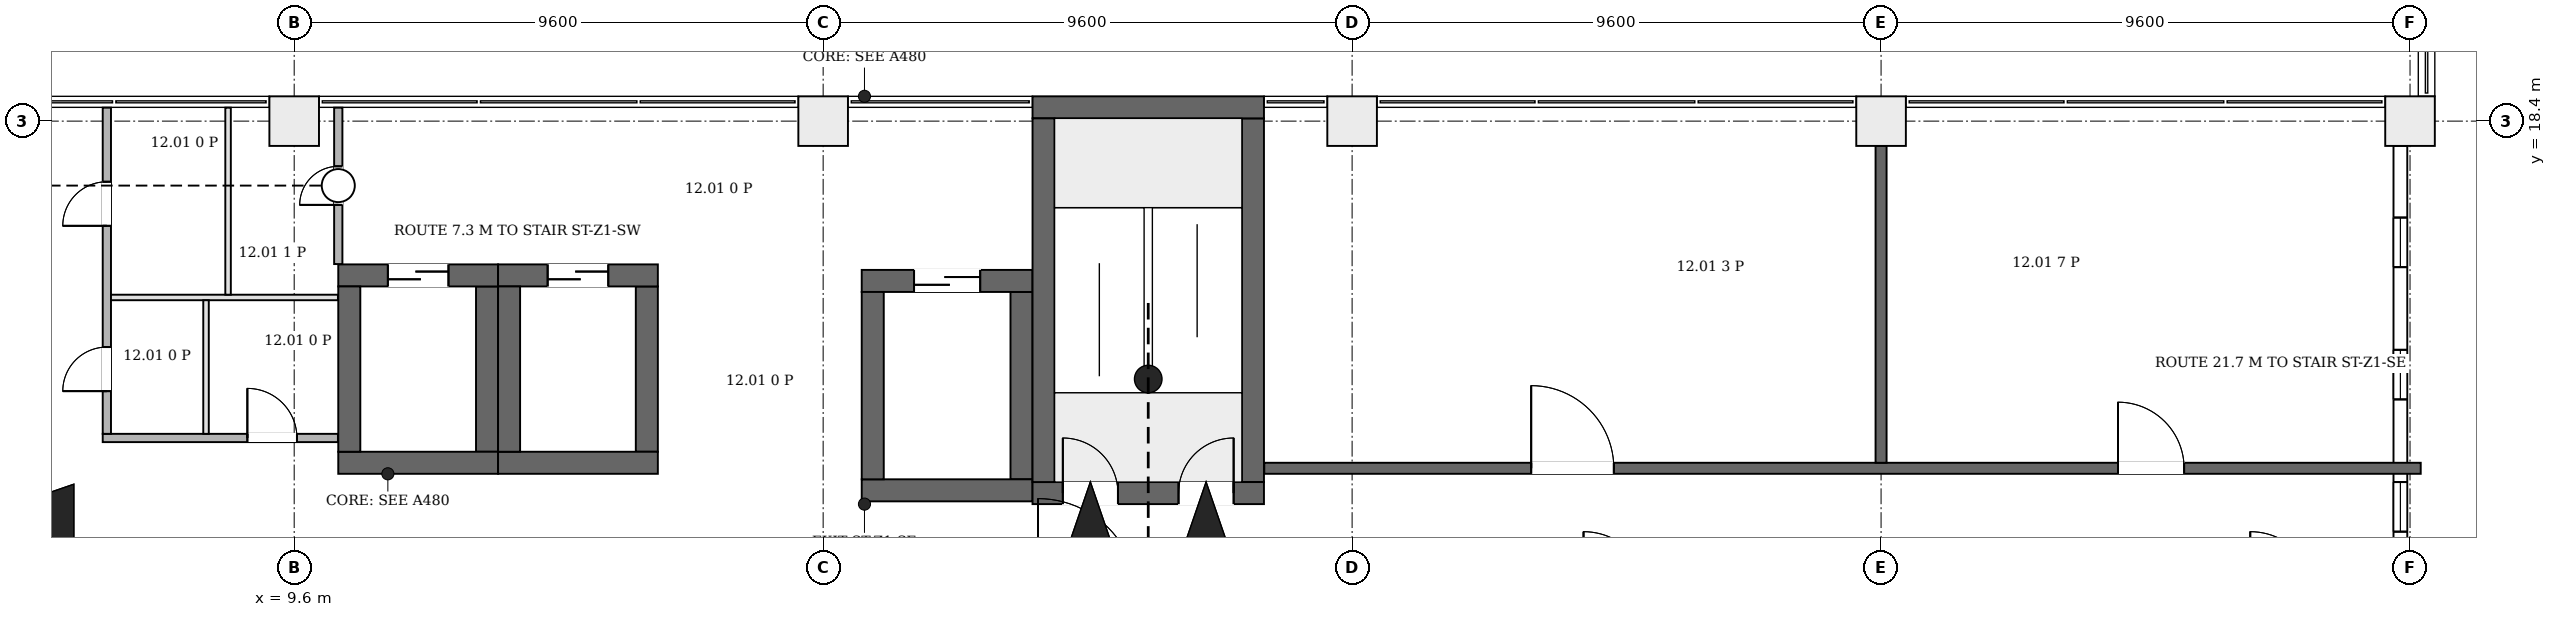
"""IFC4 building model, lengths in metres.
Left out: names, types, materials, properties, quantities, classifications, styles, units other than length and angle.
Written with IfcOpenShell. Run it as: python <this file> out.ifc"""

import sys

from ifc_helpers import new_model, si_unit, direction, frame, frame_2d, origin, origin_2d, place, context, subcontext, project, spatial, rectangle, extrude, element, fill, save


model = new_model("IFC4")
c1 = context("Model", 3, precision=1e-05, world=origin(), true_north=direction((0.0, 1.0)))
c2 = subcontext(c1, "Body", "Model", "MODEL_VIEW")
j1 = project(units=[si_unit("LENGTHUNIT", "METRE"), si_unit("PLANEANGLEUNIT", "RADIAN")], contexts=[c1])
p1 = place(None, origin())
s1 = spatial("IfcSite", under=j1, at=p1, CompositionType="ELEMENT")
p2 = place(p1, origin())
s2 = spatial("IfcBuilding", under=s1, at=p2, CompositionType="ELEMENT")
p3 = place(p2, frame((0.0, 0.0, 61.3)))
s3 = spatial("IfcBuildingStorey", under=s2, at=p3, CompositionType="ELEMENT", Elevation=61.3)
p4 = place(p3, frame((23.0, 11.65, 0.0), z_axis=(0.0, 0.0, 1.0), x_axis=(1.0, 0.0, 0.0)))
e1 = element("IfcWall", 1, at=p4, inside=s3, PredefinedType="SHEAR", context=c2, shape_type="SweptSolid", body=[
    extrude(rectangle(XDim=4.2, YDim=0.4, at=frame_2d((2.1, 0.0))), origin(), (0.0, 0.0, 1.0), 4.2),
])
p5 = place(p4, frame((0.55, 0.0, 0.0)))
e2 = element("IfcOpeningElement", 2, at=p5, cuts=e1, PredefinedType="OPENING", context=c2, shape_type="SweptSolid", body=[
    extrude(rectangle(XDim=1.0, YDim=2.1, at=frame_2d((0.5, 1.05))), frame((0.0, 0.21, 0.0), z_axis=(0.0, -1.0, 0.0), x_axis=(1.0, 0.0, 0.0)), (0.0, 0.0, 1.0), 0.42),
])
p6 = place(p4, frame((2.65, 0.0, 0.0)))
e3 = element("IfcOpeningElement", 3, at=p6, cuts=e1, PredefinedType="OPENING", context=c2, shape_type="SweptSolid", body=[
    extrude(rectangle(XDim=1.0, YDim=2.1, at=frame_2d((0.5, 1.05))), frame((0.0, 0.21, 0.0), z_axis=(0.0, -1.0, 0.0), x_axis=(1.0, 0.0, 0.0)), (0.0, 0.0, 1.0), 0.42),
])
p7 = place(p3, frame((23.0, 18.65, 0.0), z_axis=(0.0, 0.0, 1.0), x_axis=(1.0, 0.0, 0.0)))
e4 = element("IfcWall", 4, at=p7, inside=s3, PredefinedType="SHEAR", context=c2, shape_type="SweptSolid", body=[
    extrude(rectangle(XDim=4.2, YDim=0.4, at=frame_2d((2.1, 0.0))), origin(), (0.0, 0.0, 1.0), 4.2),
])
for number, where, z_axis, x_axis in (
    (5, (23.2, 11.85, 0.0), (0.0, 0.0, 1.0), (0.0, 1.0, 0.0)),
    (6, (27.0, 11.85, 0.0), (0.0, 0.0, 1.0), (0.0, 1.0, 0.0)),
):
    element("IfcWall", number, at=place(p3, frame(where, z_axis=z_axis, x_axis=x_axis)), inside=s3, PredefinedType="SHEAR", context=c2, shape_type="SweptSolid", body=[
        extrude(rectangle(XDim=6.6, YDim=0.4, at=frame_2d((3.3, 0.0))), origin(), (0.0, 0.0, 1.0), 4.2),
    ])
p8 = place(p3, frame((10.4, 12.2, 0.0), z_axis=(0.0, 0.0, 1.0), x_axis=(1.0, 0.0, 0.0)))
e7 = element("IfcWall", 7, at=p8, inside=s3, PredefinedType="SHEAR", context=c2, shape_type="SweptSolid", body=[
    extrude(rectangle(XDim=2.9, YDim=0.4, at=frame_2d((1.45, 0.0))), origin(), (0.0, 0.0, 1.0), 4.2),
])
p9 = place(p3, frame((10.4, 15.6, 0.0), z_axis=(0.0, 0.0, 1.0), x_axis=(1.0, 0.0, 0.0)))
e8 = element("IfcWall", 8, at=p9, inside=s3, PredefinedType="SHEAR", context=c2, shape_type="SweptSolid", body=[
    extrude(rectangle(XDim=2.9, YDim=0.4, at=frame_2d((1.45, 0.0))), origin(), (0.0, 0.0, 1.0), 4.2),
])
p10 = place(p9, frame((0.9, 0.0, 0.0)))
e9 = element("IfcOpeningElement", 9, at=p10, cuts=e8, PredefinedType="OPENING", context=c2, shape_type="SweptSolid", body=[
    extrude(rectangle(XDim=1.1, YDim=2.1, at=frame_2d((0.55, 1.05))), frame((0.0, 0.21, 0.0), z_axis=(0.0, -1.0, 0.0), x_axis=(1.0, 0.0, 0.0)), (0.0, 0.0, 1.0), 0.42),
])
for number, where, z_axis, x_axis in (
    (10, (10.6, 12.4, 0.0), (0.0, 0.0, 1.0), (0.0, 1.0, 0.0)),
    (11, (13.1, 12.4, 0.0), (0.0, 0.0, 1.0), (0.0, 1.0, 0.0)),
):
    element("IfcWall", number, at=place(p3, frame(where, z_axis=z_axis, x_axis=x_axis)), inside=s3, PredefinedType="SHEAR", context=c2, shape_type="SweptSolid", body=[
        extrude(rectangle(XDim=3.0, YDim=0.4, at=frame_2d((1.5, 0.0))), origin(), (0.0, 0.0, 1.0), 4.2),
    ])
p11 = place(p3, frame((13.3, 12.2, 0.0), z_axis=(0.0, 0.0, 1.0), x_axis=(1.0, 0.0, 0.0)))
e12 = element("IfcWall", 12, at=p11, inside=s3, PredefinedType="SHEAR", context=c2, shape_type="SweptSolid", body=[
    extrude(rectangle(XDim=2.9, YDim=0.4, at=frame_2d((1.45, 0.0))), origin(), (0.0, 0.0, 1.0), 4.2),
])
p12 = place(p3, frame((13.3, 15.6, 0.0), z_axis=(0.0, 0.0, 1.0), x_axis=(1.0, 0.0, 0.0)))
e13 = element("IfcWall", 13, at=p12, inside=s3, PredefinedType="SHEAR", context=c2, shape_type="SweptSolid", body=[
    extrude(rectangle(XDim=2.9, YDim=0.4, at=frame_2d((1.45, 0.0))), origin(), (0.0, 0.0, 1.0), 4.2),
])
p13 = place(p12, frame((0.9, 0.0, 0.0)))
e14 = element("IfcOpeningElement", 14, at=p13, cuts=e13, PredefinedType="OPENING", context=c2, shape_type="SweptSolid", body=[
    extrude(rectangle(XDim=1.1, YDim=2.1, at=frame_2d((0.55, 1.05))), frame((0.0, 0.21, 0.0), z_axis=(0.0, -1.0, 0.0), x_axis=(1.0, 0.0, 0.0)), (0.0, 0.0, 1.0), 0.42),
])
for number, where, z_axis, x_axis in (
    (15, (13.5, 12.4, 0.0), (0.0, 0.0, 1.0), (0.0, 1.0, 0.0)),
    (16, (16.0, 12.4, 0.0), (0.0, 0.0, 1.0), (0.0, 1.0, 0.0)),
):
    element("IfcWall", number, at=place(p3, frame(where, z_axis=z_axis, x_axis=x_axis)), inside=s3, PredefinedType="SHEAR", context=c2, shape_type="SweptSolid", body=[
        extrude(rectangle(XDim=3.0, YDim=0.4, at=frame_2d((1.5, 0.0))), origin(), (0.0, 0.0, 1.0), 4.2),
    ])
p14 = place(p3, frame((19.9, 11.7, 0.0), z_axis=(0.0, 0.0, 1.0), x_axis=(1.0, 0.0, 0.0)))
e17 = element("IfcWall", 17, at=p14, inside=s3, PredefinedType="SHEAR", context=c2, shape_type="SweptSolid", body=[
    extrude(rectangle(XDim=3.1, YDim=0.4, at=frame_2d((1.55, 0.0))), origin(), (0.0, 0.0, 1.0), 4.2),
])
p15 = place(p3, frame((19.9, 15.5, 0.0), z_axis=(0.0, 0.0, 1.0), x_axis=(1.0, 0.0, 0.0)))
e18 = element("IfcWall", 18, at=p15, inside=s3, PredefinedType="SHEAR", context=c2, shape_type="SweptSolid", body=[
    extrude(rectangle(XDim=3.1, YDim=0.4, at=frame_2d((1.55, 0.0))), origin(), (0.0, 0.0, 1.0), 4.2),
])
p16 = place(p15, frame((0.95, 0.0, 0.0)))
e19 = element("IfcOpeningElement", 19, at=p16, cuts=e18, PredefinedType="OPENING", context=c2, shape_type="SweptSolid", body=[
    extrude(rectangle(XDim=1.2, YDim=2.1, at=frame_2d((0.6, 1.05))), frame((0.0, 0.21, 0.0), z_axis=(0.0, -1.0, 0.0), x_axis=(1.0, 0.0, 0.0)), (0.0, 0.0, 1.0), 0.42),
])
for number, where, z_axis, x_axis in (
    (20, (20.1, 11.9, 0.0), (0.0, 0.0, 1.0), (0.0, 1.0, 0.0)),
    (21, (22.8, 11.9, 0.0), (0.0, 0.0, 1.0), (0.0, 1.0, 0.0)),
):
    element("IfcWall", number, at=place(p3, frame(where, z_axis=z_axis, x_axis=x_axis)), inside=s3, PredefinedType="SHEAR", context=c2, shape_type="SweptSolid", body=[
        extrude(rectangle(XDim=3.4, YDim=0.4, at=frame_2d((1.7, 0.0))), origin(), (0.0, 0.0, 1.0), 4.2),
    ])
for number, where, z_axis, x_axis in (
    (22, (9.6, 18.4, 0.0), (0.0, 0.0, 1.0), (1.0, 0.0, 0.0)),
    (23, (19.2, 18.4, 0.0), (0.0, 0.0, 1.0), (1.0, 0.0, 0.0)),
    (24, (28.8, 18.4, 0.0), (0.0, 0.0, 1.0), (1.0, 0.0, 0.0)),
    (25, (38.4, 18.4, 0.0), (0.0, 0.0, 1.0), (1.0, 0.0, 0.0)),
    (26, (48.0, 18.4, 0.0), (0.0, 0.0, 1.0), (1.0, 0.0, 0.0)),
):
    element("IfcColumn", number, at=place(p3, frame(where, z_axis=z_axis, x_axis=x_axis)), inside=s3, PredefinedType="COLUMN", context=c2, shape_type="SweptSolid", body=[
        extrude(rectangle(XDim=0.9, YDim=0.9, at=origin_2d()), origin(), (0.0, 0.0, 1.0), 4.2),
    ])
p17 = place(p3, frame((47.825, 9.65, 0.0), z_axis=(0.0, 0.0, 1.0), x_axis=(0.0, 1.0, 0.0)))
e27 = element("IfcWall", 27, at=p17, inside=s3, PredefinedType="ELEMENTEDWALL", context=c2, shape_type="SweptSolid", body=[
    extrude(rectangle(XDim=8.3, YDim=0.25, at=frame_2d((4.15, 0.0))), origin(), (0.0, 0.0, 1.0), 3.3),
])
p18 = place(p17, frame((1.3, 0.0, 0.6)))
e28 = element("IfcOpeningElement", 28, at=p18, cuts=e27, PredefinedType="OPENING", context=c2, shape_type="SweptSolid", body=[
    extrude(rectangle(XDim=0.9, YDim=2.6, at=frame_2d((0.45, 1.3))), frame((0.0, 0.135, 0.0), z_axis=(0.0, -1.0, 0.0), x_axis=(1.0, 0.0, 0.0)), (0.0, 0.0, 1.0), 0.27),
])
p19 = place(p17, frame((3.7, 0.0, 0.6)))
e29 = element("IfcOpeningElement", 29, at=p19, cuts=e27, PredefinedType="OPENING", context=c2, shape_type="SweptSolid", body=[
    extrude(rectangle(XDim=0.9, YDim=2.6, at=frame_2d((0.45, 1.3))), frame((0.0, 0.135, 0.0), z_axis=(0.0, -1.0, 0.0), x_axis=(1.0, 0.0, 0.0)), (0.0, 0.0, 1.0), 0.27),
])
p20 = place(p17, frame((6.1, 0.0, 0.6)))
e30 = element("IfcOpeningElement", 30, at=p20, cuts=e27, PredefinedType="OPENING", context=c2, shape_type="SweptSolid", body=[
    extrude(rectangle(XDim=0.9, YDim=2.6, at=frame_2d((0.45, 1.3))), frame((0.0, 0.135, 0.0), z_axis=(0.0, -1.0, 0.0), x_axis=(1.0, 0.0, 0.0)), (0.0, 0.0, 1.0), 0.27),
])
p21 = place(p3, frame((6.125, 12.65, 0.0), z_axis=(0.0, 0.0, 1.0), x_axis=(1.0, 0.0, 0.0)))
e31 = element("IfcWall", 31, at=p21, inside=s3, PredefinedType="PARTITIONING", context=c2, shape_type="SweptSolid", body=[
    extrude(rectangle(XDim=4.269, YDim=0.15, at=frame_2d((2.135, 0.0))), origin(), (0.0, 0.0, 1.0), 3.9),
])
p22 = place(p21, frame((2.625, 0.0, 0.0)))
e32 = element("IfcOpeningElement", 32, at=p22, cuts=e31, PredefinedType="OPENING", context=c2, shape_type="SweptSolid", body=[
    extrude(rectangle(XDim=0.9, YDim=2.1, at=frame_2d((0.45, 1.05))), frame((0.0, 0.085, 0.0), z_axis=(0.0, -1.0, 0.0), x_axis=(1.0, 0.0, 0.0)), (0.0, 0.0, 1.0), 0.17),
])
p23 = place(p3, frame((6.2, 12.725, 0.0), z_axis=(0.0, 0.0, 1.0), x_axis=(0.0, 1.0, 0.0)))
e33 = element("IfcWall", 33, at=p23, inside=s3, PredefinedType="PARTITIONING", context=c2, shape_type="SweptSolid", body=[
    extrude(rectangle(XDim=5.919, YDim=0.15, at=frame_2d((2.959, 0.0))), origin(), (0.0, 0.0, 1.0), 3.9),
])
p24 = place(p23, frame((0.775, 0.0, 0.0)))
e34 = element("IfcOpeningElement", 34, at=p24, cuts=e33, PredefinedType="OPENING", context=c2, shape_type="SweptSolid", body=[
    extrude(rectangle(XDim=0.8, YDim=2.1, at=frame_2d((0.4, 1.05))), frame((0.0, 0.085, 0.0), z_axis=(0.0, -1.0, 0.0), x_axis=(1.0, 0.0, 0.0)), (0.0, 0.0, 1.0), 0.17),
])
p25 = place(p23, frame((3.775, 0.0, 0.0)))
e35 = element("IfcOpeningElement", 35, at=p25, cuts=e33, PredefinedType="OPENING", context=c2, shape_type="SweptSolid", body=[
    extrude(rectangle(XDim=0.8, YDim=2.1, at=frame_2d((0.4, 1.05))), frame((0.0, 0.085, 0.0), z_axis=(0.0, -1.0, 0.0), x_axis=(1.0, 0.0, 0.0)), (0.0, 0.0, 1.0), 0.17),
])
p26 = place(p3, frame((6.275, 15.2, 0.0), z_axis=(0.0, 0.0, 1.0), x_axis=(1.0, 0.0, 0.0)))
e36 = element("IfcWall", 36, at=p26, inside=s3, PredefinedType="PARTITIONING", context=c2, shape_type="SweptSolid", body=[
    extrude(rectangle(XDim=4.119, YDim=0.1, at=frame_2d((2.06, 0.0))), origin(), (0.0, 0.0, 1.0), 3.9),
])
p27 = place(p3, frame((8.0, 12.725, 0.0), z_axis=(0.0, 0.0, 1.0), x_axis=(0.0, 1.0, 0.0)))
e37 = element("IfcWall", 37, at=p27, inside=s3, PredefinedType="PARTITIONING", context=c2, shape_type="SweptSolid", body=[
    extrude(rectangle(XDim=2.425, YDim=0.1, at=frame_2d((1.212, 0.0))), origin(), (0.0, 0.0, 1.0), 3.9),
])
p28 = place(p3, frame((8.4, 15.25, 0.0), z_axis=(0.0, 0.0, 1.0), x_axis=(0.0, 1.0, 0.0)))
e38 = element("IfcWall", 38, at=p28, inside=s3, PredefinedType="PARTITIONING", context=c2, shape_type="SweptSolid", body=[
    extrude(rectangle(XDim=3.394, YDim=0.1, at=frame_2d((1.697, 0.0))), origin(), (0.0, 0.0, 1.0), 3.9),
])
p29 = place(p3, frame((10.4, 15.806, 0.0), z_axis=(0.0, 0.0, 1.0), x_axis=(0.0, 1.0, 0.0)))
e39 = element("IfcWall", 39, at=p29, inside=s3, PredefinedType="PARTITIONING", context=c2, shape_type="SweptSolid", body=[
    extrude(rectangle(XDim=2.838, YDim=0.15, at=frame_2d((1.419, 0.0))), origin(), (0.0, 0.0, 1.0), 3.9),
])
p30 = place(p29, frame((1.074, 0.0, 0.0)))
e40 = element("IfcOpeningElement", 40, at=p30, cuts=e39, PredefinedType="OPENING", context=c2, shape_type="SweptSolid", body=[
    extrude(rectangle(XDim=0.7, YDim=2.1, at=frame_2d((0.35, 1.05))), frame((0.0, 0.085, 0.0), z_axis=(0.0, -1.0, 0.0), x_axis=(1.0, 0.0, 0.0)), (0.0, 0.0, 1.0), 0.17),
])
p31 = place(p3, frame((27.206, 12.1, 0.0), z_axis=(0.0, 0.0, 1.0), x_axis=(1.0, 0.0, 0.0)))
e41 = element("IfcWall", 41, at=p31, inside=s3, PredefinedType="PARTITIONING", context=c2, shape_type="SweptSolid", body=[
    extrude(rectangle(XDim=20.988, YDim=0.2, at=frame_2d((10.494, 0.0))), origin(), (0.0, 0.0, 1.0), 3.9),
])
p32 = place(p31, frame((4.844, 0.0, 0.0)))
e42 = element("IfcOpeningElement", 42, at=p32, cuts=e41, PredefinedType="OPENING", context=c2, shape_type="SweptSolid", body=[
    extrude(rectangle(XDim=1.5, YDim=2.1, at=frame_2d((0.75, 1.05))), frame((0.0, 0.11, 0.0), z_axis=(0.0, -1.0, 0.0), x_axis=(1.0, 0.0, 0.0)), (0.0, 0.0, 1.0), 0.22),
])
p33 = place(p31, frame((15.494, 0.0, 0.0)))
e43 = element("IfcOpeningElement", 43, at=p33, cuts=e41, PredefinedType="OPENING", context=c2, shape_type="SweptSolid", body=[
    extrude(rectangle(XDim=1.2, YDim=2.1, at=frame_2d((0.6, 1.05))), frame((0.0, 0.11, 0.0), z_axis=(0.0, -1.0, 0.0), x_axis=(1.0, 0.0, 0.0)), (0.0, 0.0, 1.0), 0.22),
])
p34 = place(p3, frame((38.4, 12.2, 0.0), z_axis=(0.0, 0.0, 1.0), x_axis=(0.0, 1.0, 0.0)))
e44 = element("IfcWall", 44, at=p34, inside=s3, PredefinedType="PARTITIONING", context=c2, shape_type="SweptSolid", body=[
    extrude(rectangle(XDim=5.75, YDim=0.2, at=frame_2d((2.875, 0.0))), origin(), (0.0, 0.0, 1.0), 3.9),
])
p35 = place(p18, origin())
e45 = element("IfcWindow", 45, at=p35, inside=s3, PartitioningType="SINGLE_PANEL", PredefinedType="WINDOW", context=c2, shape_type="SweptSolid", body=[
    extrude(rectangle(XDim=0.9, YDim=2.6, at=frame_2d((0.45, 1.3))), frame((0.0, 0.03, 0.0), z_axis=(0.0, -1.0, 0.0), x_axis=(1.0, 0.0, 0.0)), (0.0, 0.0, 1.0), 0.06),
])
fill(e28, e45)
p36 = place(p19, origin())
e46 = element("IfcWindow", 46, at=p36, inside=s3, PartitioningType="SINGLE_PANEL", PredefinedType="WINDOW", context=c2, shape_type="SweptSolid", body=[
    extrude(rectangle(XDim=0.9, YDim=2.6, at=frame_2d((0.45, 1.3))), frame((0.0, 0.03, 0.0), z_axis=(0.0, -1.0, 0.0), x_axis=(1.0, 0.0, 0.0)), (0.0, 0.0, 1.0), 0.06),
])
fill(e29, e46)
p37 = place(p20, origin())
e47 = element("IfcWindow", 47, at=p37, inside=s3, PartitioningType="SINGLE_PANEL", PredefinedType="WINDOW", context=c2, shape_type="SweptSolid", body=[
    extrude(rectangle(XDim=0.9, YDim=2.6, at=frame_2d((0.45, 1.3))), frame((0.0, 0.03, 0.0), z_axis=(0.0, -1.0, 0.0), x_axis=(1.0, 0.0, 0.0)), (0.0, 0.0, 1.0), 0.06),
])
fill(e30, e47)
p38 = place(p5, origin())
e48 = element("IfcDoor", 48, at=p38, inside=s3, OperationType="SINGLE_SWING_RIGHT", PredefinedType="DOOR", context=c2, shape_type="SweptSolid", body=[
    extrude(rectangle(XDim=1.0, YDim=2.1, at=frame_2d((0.5, 1.05))), frame((0.0, 0.025, 0.0), z_axis=(0.0, -1.0, 0.0), x_axis=(1.0, 0.0, 0.0)), (0.0, 0.0, 1.0), 0.05),
])
fill(e2, e48)
p39 = place(p6, origin())
e49 = element("IfcDoor", 49, at=p39, inside=s3, OperationType="SINGLE_SWING_LEFT", PredefinedType="DOOR", context=c2, shape_type="SweptSolid", body=[
    extrude(rectangle(XDim=1.0, YDim=2.1, at=frame_2d((0.5, 1.05))), frame((0.0, 0.025, 0.0), z_axis=(0.0, -1.0, 0.0), x_axis=(1.0, 0.0, 0.0)), (0.0, 0.0, 1.0), 0.05),
])
fill(e3, e49)
p40 = place(p10, origin())
e50 = element("IfcDoor", 50, at=p40, inside=s3, OperationType="DOUBLE_DOOR_SLIDING", PredefinedType="DOOR", context=c2, shape_type="SweptSolid", body=[
    extrude(rectangle(XDim=1.1, YDim=2.1, at=frame_2d((0.55, 1.05))), frame((0.0, 0.025, 0.0), z_axis=(0.0, -1.0, 0.0), x_axis=(1.0, 0.0, 0.0)), (0.0, 0.0, 1.0), 0.05),
])
fill(e9, e50)
p41 = place(p13, origin())
e51 = element("IfcDoor", 51, at=p41, inside=s3, OperationType="DOUBLE_DOOR_SLIDING", PredefinedType="DOOR", context=c2, shape_type="SweptSolid", body=[
    extrude(rectangle(XDim=1.1, YDim=2.1, at=frame_2d((0.55, 1.05))), frame((0.0, 0.025, 0.0), z_axis=(0.0, -1.0, 0.0), x_axis=(1.0, 0.0, 0.0)), (0.0, 0.0, 1.0), 0.05),
])
fill(e14, e51)
p42 = place(p16, origin())
e52 = element("IfcDoor", 52, at=p42, inside=s3, OperationType="DOUBLE_DOOR_SLIDING", PredefinedType="DOOR", context=c2, shape_type="SweptSolid", body=[
    extrude(rectangle(XDim=1.2, YDim=2.1, at=frame_2d((0.6, 1.05))), frame((0.0, 0.025, 0.0), z_axis=(0.0, -1.0, 0.0), x_axis=(1.0, 0.0, 0.0)), (0.0, 0.0, 1.0), 0.05),
])
fill(e19, e52)
p43 = place(p24, origin())
e53 = element("IfcDoor", 53, at=p43, inside=s3, OperationType="SINGLE_SWING_LEFT", PredefinedType="DOOR", context=c2, shape_type="SweptSolid", body=[
    extrude(rectangle(XDim=0.8, YDim=2.1, at=frame_2d((0.4, 1.05))), frame((0.0, 0.025, 0.0), z_axis=(0.0, -1.0, 0.0), x_axis=(1.0, 0.0, 0.0)), (0.0, 0.0, 1.0), 0.05),
])
fill(e34, e53)
p44 = place(p22, origin())
e54 = element("IfcDoor", 54, at=p44, inside=s3, OperationType="SINGLE_SWING_RIGHT", PredefinedType="DOOR", context=c2, shape_type="SweptSolid", body=[
    extrude(rectangle(XDim=0.9, YDim=2.1, at=frame_2d((0.45, 1.05))), frame((0.0, 0.025, 0.0), z_axis=(0.0, -1.0, 0.0), x_axis=(1.0, 0.0, 0.0)), (0.0, 0.0, 1.0), 0.05),
])
fill(e32, e54)
p45 = place(p25, origin())
e55 = element("IfcDoor", 55, at=p45, inside=s3, OperationType="SINGLE_SWING_LEFT", PredefinedType="DOOR", context=c2, shape_type="SweptSolid", body=[
    extrude(rectangle(XDim=0.8, YDim=2.1, at=frame_2d((0.4, 1.05))), frame((0.0, 0.025, 0.0), z_axis=(0.0, -1.0, 0.0), x_axis=(1.0, 0.0, 0.0)), (0.0, 0.0, 1.0), 0.05),
])
fill(e35, e55)
p46 = place(p30, origin())
e56 = element("IfcDoor", 56, at=p46, inside=s3, OperationType="SINGLE_SWING_LEFT", PredefinedType="DOOR", context=c2, shape_type="SweptSolid", body=[
    extrude(rectangle(XDim=0.7, YDim=2.1, at=frame_2d((0.35, 1.05))), frame((0.0, 0.025, 0.0), z_axis=(0.0, -1.0, 0.0), x_axis=(1.0, 0.0, 0.0)), (0.0, 0.0, 1.0), 0.05),
])
fill(e40, e56)
p47 = place(p32, origin())
e57 = element("IfcDoor", 57, at=p47, inside=s3, OperationType="DOUBLE_DOOR_SINGLE_SWING", PredefinedType="DOOR", context=c2, shape_type="SweptSolid", body=[
    extrude(rectangle(XDim=1.5, YDim=2.1, at=frame_2d((0.75, 1.05))), frame((0.0, 0.025, 0.0), z_axis=(0.0, -1.0, 0.0), x_axis=(1.0, 0.0, 0.0)), (0.0, 0.0, 1.0), 0.05),
])
fill(e42, e57)
p48 = place(p33, origin())
e58 = element("IfcDoor", 58, at=p48, inside=s3, OperationType="SINGLE_SWING_RIGHT", PredefinedType="DOOR", context=c2, shape_type="SweptSolid", body=[
    extrude(rectangle(XDim=1.2, YDim=2.1, at=frame_2d((0.6, 1.05))), frame((0.0, 0.025, 0.0), z_axis=(0.0, -1.0, 0.0), x_axis=(1.0, 0.0, 0.0)), (0.0, 0.0, 1.0), 0.05),
])
fill(e43, e58)
save(model, sys.argv[1])
